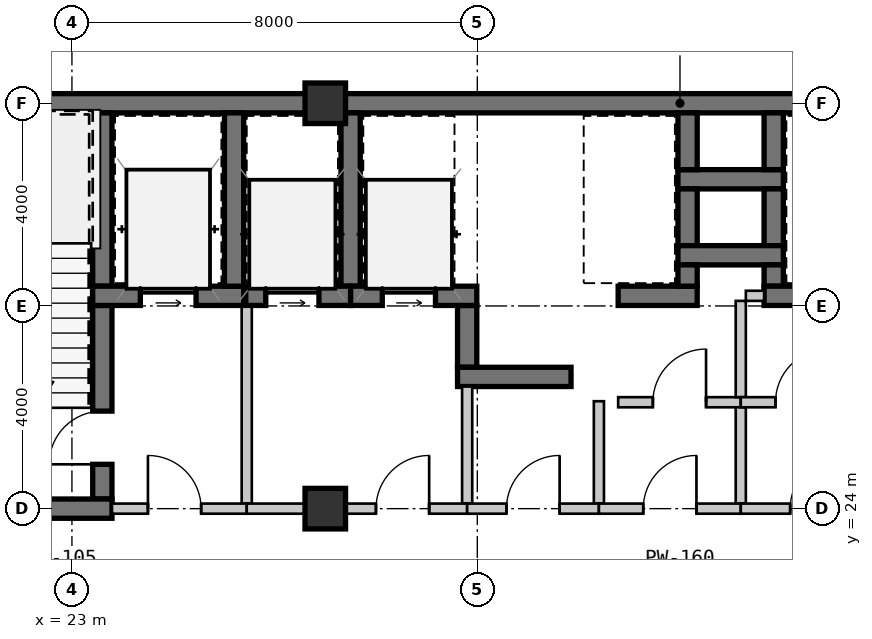
"""IFC4 building model, lengths in metres.
Left out: names, types, materials, properties, quantities, classifications, styles, units other than length and angle.
Written with IfcOpenShell. Run it as: python <this file> out.ifc"""

import sys

from ifc_helpers import new_model, si_unit, direction, frame, frame_2d, origin, origin_2d, place, context, subcontext, project, spatial, rectangle, extrude, source, transform, mapped, element, fill, save


model = new_model("IFC4")
c1 = context("Model", 3, precision=1e-05, world=origin(), true_north=direction((0.0, 1.0)))
c2 = subcontext(c1, "Body", "Model", "MODEL_VIEW")
j1 = project(units=[si_unit("LENGTHUNIT", "METRE"), si_unit("PLANEANGLEUNIT", "RADIAN")], contexts=[c1])
p1 = place(None, origin())
s1 = spatial("IfcSite", under=j1, at=p1, CompositionType="ELEMENT")
p2 = place(p1, origin())
s2 = spatial("IfcBuilding", under=s1, at=p2, CompositionType="ELEMENT")
p3 = place(p2, frame((0.0, 0.0, 45.15)))
s3 = spatial("IfcBuildingStorey", under=s2, at=p3, CompositionType="ELEMENT", Elevation=45.15)
m1 = source(origin(), c2, "Body", "SweptSolid", [
    extrude(rectangle(XDim=0.8, YDim=0.8, at=origin_2d()), origin(), (0.0, 0.0, 1.0), 3.15),
])
for number, where, z_axis, x_axis in (
    (1, (28.0, 24.0, 0.0), (0.0, 0.0, 1.0), (1.0, 0.0, 0.0)),
    (2, (28.0, 32.0, 0.0), (0.0, 0.0, 1.0), (1.0, 0.0, 0.0)),
):
    element("IfcColumn", number, at=place(p3, frame(where, z_axis=z_axis, x_axis=x_axis)), inside=s3, PredefinedType="COLUMN", context=c2, shape_type="MappedRepresentation", body=[
        mapped(m1, transform((0.0, 0.0, 0.0), scale=1.0)),
    ])
m2 = source(origin(), c2, "Body", "SweptSolid", [
    extrude(rectangle(XDim=9.19, YDim=0.38, at=frame_2d((4.595, 0.0))), origin(), (0.0, 0.0, 1.0), 2.93),
])
p4 = place(p3, frame((18.81, 32.0, 0.0), z_axis=(0.0, 0.0, 1.0), x_axis=(1.0, 0.0, 0.0)))
e3 = element("IfcWall", 3, at=p4, inside=s3, PredefinedType="SHEAR", context=c2, shape_type="MappedRepresentation", body=[
    mapped(m2, transform((0.0, 0.0, 0.0), scale=1.0)),
])
m3 = source(origin(), c2, "Body", "SweptSolid", [
    extrude(rectangle(XDim=11.2, YDim=0.38, at=frame_2d((5.6, 0.0))), origin(), (0.0, 0.0, 1.0), 2.93),
])
p5 = place(p3, frame((28.0, 32.0, 0.0), z_axis=(0.0, 0.0, 1.0), x_axis=(1.0, 0.0, 0.0)))
e4 = element("IfcWall", 4, at=p5, inside=s3, PredefinedType="SHEAR", context=c2, shape_type="MappedRepresentation", body=[
    mapped(m3, transform((0.0, 0.0, 0.0), scale=1.0)),
])
m4 = source(origin(), c2, "Body", "SweptSolid", [
    extrude(rectangle(XDim=3.42, YDim=0.38, at=frame_2d((1.71, 0.0))), origin(), (0.0, 0.0, 1.0), 2.93),
])
p6 = place(p3, frame((23.6, 28.39, 0.0), z_axis=(0.0, 0.0, 1.0), x_axis=(0.0, 1.0, 0.0)))
e5 = element("IfcWall", 5, at=p6, inside=s3, PredefinedType="SHEAR", context=c2, shape_type="MappedRepresentation", body=[
    mapped(m4, transform((0.0, 0.0, 0.0), scale=1.0)),
])
m5 = source(origin(), c2, "Body", "SweptSolid", [
    extrude(rectangle(XDim=3.82, YDim=0.38, at=frame_2d((1.91, 0.0))), origin(), (0.0, 0.0, 1.0), 2.93),
])
p7 = place(p3, frame((23.6, 24.19, 0.0), z_axis=(0.0, 0.0, 1.0), x_axis=(0.0, 1.0, 0.0)))
e6 = element("IfcWall", 6, at=p7, inside=s3, PredefinedType="SHEAR", context=c2, shape_type="MappedRepresentation", body=[
    mapped(m5, transform((0.0, 0.0, 0.0), scale=1.0)),
])
m6 = source(origin(), c2, "Body", "SweptSolid", [
    extrude(rectangle(XDim=1.05, YDim=2.1, at=frame_2d((0.525, 1.05))), frame((0.0, 0.2, 0.0), z_axis=(0.0, -1.0, 0.0), x_axis=(1.0, 0.0, 0.0)), (0.0, 0.0, 1.0), 0.4),
])
p8 = place(p7, frame((0.685, 0.0, 0.0)))
e7 = element("IfcOpeningElement", 7, at=p8, cuts=e6, PredefinedType="OPENING", context=c2, shape_type="MappedRepresentation", body=[
    mapped(m6, transform((0.0, 0.0, 0.0), scale=1.0)),
])
m7 = source(origin(), c2, "Body", "SweptSolid", [
    extrude(rectangle(XDim=4.98, YDim=0.38, at=frame_2d((2.49, 0.0))), origin(), (0.0, 0.0, 1.0), 2.93),
])
p9 = place(p3, frame((18.81, 24.0, 0.0), z_axis=(0.0, 0.0, 1.0), x_axis=(1.0, 0.0, 0.0)))
e8 = element("IfcWall", 8, at=p9, inside=s3, PredefinedType="SHEAR", context=c2, shape_type="MappedRepresentation", body=[
    mapped(m7, transform((0.0, 0.0, 0.0), scale=1.0)),
])
m8 = source(origin(), c2, "Body", "SweptSolid", [
    extrude(rectangle(XDim=2.98, YDim=0.38, at=frame_2d((1.49, 0.0))), origin(), (0.0, 0.0, 1.0), 2.93),
])
p10 = place(p3, frame((23.41, 28.2, 0.0), z_axis=(0.0, 0.0, 1.0), x_axis=(1.0, 0.0, 0.0)))
e9 = element("IfcWall", 9, at=p10, inside=s3, PredefinedType="SHEAR", context=c2, shape_type="MappedRepresentation", body=[
    mapped(m8, transform((0.0, 0.0, 0.0), scale=1.0)),
])
m9 = source(origin(), c2, "Body", "SweptSolid", [
    extrude(rectangle(XDim=1.1, YDim=2.15, at=frame_2d((0.55, 1.075))), frame((0.0, 0.2, 0.0), z_axis=(0.0, -1.0, 0.0), x_axis=(1.0, 0.0, 0.0)), (0.0, 0.0, 1.0), 0.4),
])
p11 = place(p10, frame((0.94, 0.0, 0.0)))
e10 = element("IfcOpeningElement", 10, at=p11, cuts=e9, PredefinedType="OPENING", context=c2, shape_type="MappedRepresentation", body=[
    mapped(m9, transform((0.0, 0.0, 0.0), scale=1.0)),
])
p12 = place(p3, frame((26.2, 28.39, 0.0), z_axis=(0.0, 0.0, 1.0), x_axis=(0.0, 1.0, 0.0)))
e11 = element("IfcWall", 11, at=p12, inside=s3, PredefinedType="SHEAR", context=c2, shape_type="MappedRepresentation", body=[
    mapped(m4, transform((0.0, 0.0, 0.0), scale=1.0)),
])
m10 = source(origin(), c2, "Body", "SweptSolid", [
    extrude(rectangle(XDim=3.91, YDim=0.2, at=frame_2d((1.955, 0.0))), origin(), (0.0, 0.0, 1.0), 2.93),
])
p13 = place(p3, frame((26.45, 24.1, 0.0), z_axis=(0.0, 0.0, 1.0), x_axis=(0.0, 1.0, 0.0)))
e12 = element("IfcWall", 12, at=p13, inside=s3, PredefinedType="SOLIDWALL", context=c2, shape_type="MappedRepresentation", body=[
    mapped(m10, transform((0.0, 0.0, 0.0), scale=1.0)),
])
m11 = source(origin(), c2, "Body", "SweptSolid", [
    extrude(rectangle(XDim=2.66, YDim=0.2, at=frame_2d((1.33, 0.0))), origin(), (0.0, 0.0, 1.0), 2.47),
])
p14 = place(p3, frame((23.79, 24.0, 0.0), z_axis=(0.0, 0.0, 1.0), x_axis=(1.0, 0.0, 0.0)))
e13 = element("IfcWall", 13, at=p14, inside=s3, PredefinedType="SOLIDWALL", context=c2, shape_type="MappedRepresentation", body=[
    mapped(m11, transform((0.0, 0.0, 0.0), scale=1.0)),
])
m12 = source(origin(), c2, "Body", "SweptSolid", [
    extrude(rectangle(XDim=1.05, YDim=2.1, at=frame_2d((0.525, 1.05))), frame((0.0, 0.11, 0.0), z_axis=(0.0, -1.0, 0.0), x_axis=(1.0, 0.0, 0.0)), (0.0, 0.0, 1.0), 0.22),
])
p15 = place(p14, frame((0.71, 0.0, 0.0)))
e14 = element("IfcOpeningElement", 14, at=p15, cuts=e13, PredefinedType="OPENING", context=c2, shape_type="MappedRepresentation", body=[
    mapped(m12, transform((0.0, 0.0, 0.0), scale=1.0)),
])
m13 = source(origin(), c2, "Body", "SweptSolid", [
    extrude(rectangle(XDim=2.08, YDim=0.38, at=frame_2d((1.04, 0.0))), origin(), (0.0, 0.0, 1.0), 2.93),
])
p16 = place(p3, frame((34.96, 30.5, 0.0), z_axis=(0.0, 0.0, 1.0), x_axis=(1.0, 0.0, 0.0)))
e15 = element("IfcWall", 15, at=p16, inside=s3, PredefinedType="SHEAR", context=c2, shape_type="MappedRepresentation", body=[
    mapped(m13, transform((0.0, 0.0, 0.0), scale=1.0)),
])
m14 = source(origin(), c2, "Body", "SweptSolid", [
    extrude(rectangle(XDim=1.12, YDim=0.38, at=frame_2d((0.56, 0.0))), origin(), (0.0, 0.0, 1.0), 2.93),
])
for number, where, z_axis, x_axis in (
    (16, (35.15, 31.81, 0.0), (0.0, 0.0, 1.0), (0.0, -1.0, 0.0)),
    (17, (36.85, 30.69, 0.0), (0.0, 0.0, 1.0), (0.0, 1.0, 0.0)),
    (18, (35.15, 30.31, 0.0), (0.0, 0.0, 1.0), (0.0, -1.0, 0.0)),
    (19, (36.85, 29.19, 0.0), (0.0, 0.0, 1.0), (0.0, 1.0, 0.0)),
):
    element("IfcWall", number, at=place(p3, frame(where, z_axis=z_axis, x_axis=x_axis)), inside=s3, PredefinedType="SHEAR", context=c2, shape_type="MappedRepresentation", body=[
        mapped(m14, transform((0.0, 0.0, 0.0), scale=1.0)),
    ])
p17 = place(p3, frame((34.96, 29.0, 0.0), z_axis=(0.0, 0.0, 1.0), x_axis=(1.0, 0.0, 0.0)))
e20 = element("IfcWall", 20, at=p17, inside=s3, PredefinedType="SHEAR", context=c2, shape_type="MappedRepresentation", body=[
    mapped(m13, transform((0.0, 0.0, 0.0), scale=1.0)),
])
m15 = source(origin(), c2, "Body", "SweptSolid", [
    extrude(rectangle(XDim=1.22, YDim=0.38, at=frame_2d((0.61, 0.0))), origin(), (0.0, 0.0, 1.0), 2.93),
])
p18 = place(p3, frame((30.8, 28.01, 0.0), z_axis=(0.0, 0.0, 1.0), x_axis=(0.0, -1.0, 0.0)))
e21 = element("IfcWall", 21, at=p18, inside=s3, PredefinedType="SHEAR", context=c2, shape_type="MappedRepresentation", body=[
    mapped(m15, transform((0.0, 0.0, 0.0), scale=1.0)),
])
m16 = source(origin(), c2, "Body", "SweptSolid", [
    extrude(rectangle(XDim=2.24, YDim=0.38, at=frame_2d((1.12, 0.0))), origin(), (0.0, 0.0, 1.0), 2.93),
])
p19 = place(p3, frame((30.61, 26.6, 0.0), z_axis=(0.0, 0.0, 1.0), x_axis=(1.0, 0.0, 0.0)))
e22 = element("IfcWall", 22, at=p19, inside=s3, PredefinedType="SHEAR", context=c2, shape_type="MappedRepresentation", body=[
    mapped(m16, transform((0.0, 0.0, 0.0), scale=1.0)),
])
p20 = place(p3, frame((28.5, 28.39, 0.0), z_axis=(0.0, 0.0, 1.0), x_axis=(0.0, 1.0, 0.0)))
e23 = element("IfcWall", 23, at=p20, inside=s3, PredefinedType="SHEAR", context=c2, shape_type="MappedRepresentation", body=[
    mapped(m4, transform((0.0, 0.0, 0.0), scale=1.0)),
])
m17 = source(origin(), c2, "Body", "SweptSolid", [
    extrude(rectangle(XDim=2.07, YDim=0.38, at=frame_2d((1.035, 0.0))), origin(), (0.0, 0.0, 1.0), 2.93),
])
p21 = place(p3, frame((26.43, 28.2, 0.0), z_axis=(0.0, 0.0, 1.0), x_axis=(1.0, 0.0, 0.0)))
e24 = element("IfcWall", 24, at=p21, inside=s3, PredefinedType="SHEAR", context=c2, shape_type="MappedRepresentation", body=[
    mapped(m17, transform((0.0, 0.0, 0.0), scale=1.0)),
])
m18 = source(origin(), c2, "Body", "SweptSolid", [
    extrude(rectangle(XDim=1.05, YDim=2.15, at=frame_2d((0.525, 1.075))), frame((0.0, 0.2, 0.0), z_axis=(0.0, -1.0, 0.0), x_axis=(1.0, 0.0, 0.0)), (0.0, 0.0, 1.0), 0.4),
])
p22 = place(p21, frame((0.395, 0.0, 0.0)))
e25 = element("IfcOpeningElement", 25, at=p22, cuts=e24, PredefinedType="OPENING", context=c2, shape_type="MappedRepresentation", body=[
    mapped(m18, transform((0.0, 0.0, 0.0), scale=1.0)),
])
m19 = source(origin(), c2, "Body", "SweptSolid", [
    extrude(rectangle(XDim=2.49, YDim=0.38, at=frame_2d((1.245, 0.0))), origin(), (0.0, 0.0, 1.0), 2.93),
])
p23 = place(p3, frame((28.5, 28.2, 0.0), z_axis=(0.0, 0.0, 1.0), x_axis=(1.0, 0.0, 0.0)))
e26 = element("IfcWall", 26, at=p23, inside=s3, PredefinedType="SHEAR", context=c2, shape_type="MappedRepresentation", body=[
    mapped(m19, transform((0.0, 0.0, 0.0), scale=1.0)),
])
p24 = place(p23, frame((0.625, 0.0, 0.0)))
e27 = element("IfcOpeningElement", 27, at=p24, cuts=e26, PredefinedType="OPENING", context=c2, shape_type="MappedRepresentation", body=[
    mapped(m18, transform((0.0, 0.0, 0.0), scale=1.0)),
])
m20 = source(origin(), c2, "Body", "SweptSolid", [
    extrude(rectangle(XDim=2.31, YDim=0.2, at=frame_2d((1.155, 0.0))), origin(), (0.0, 0.0, 1.0), 2.93),
])
p25 = place(p3, frame((30.8, 26.41, 0.0), z_axis=(0.0, 0.0, 1.0), x_axis=(0.0, -1.0, 0.0)))
e28 = element("IfcWall", 28, at=p25, inside=s3, PredefinedType="SOLIDWALL", context=c2, shape_type="MappedRepresentation", body=[
    mapped(m20, transform((0.0, 0.0, 0.0), scale=1.0)),
])
m21 = source(origin(), c2, "Body", "SweptSolid", [
    extrude(rectangle(XDim=4.35, YDim=0.2, at=frame_2d((2.175, 0.0))), origin(), (0.0, 0.0, 1.0), 2.47),
])
p26 = place(p3, frame((30.8, 24.0, 0.0), z_axis=(0.0, 0.0, 1.0), x_axis=(-1.0, 0.0, 0.0)))
e29 = element("IfcWall", 29, at=p26, inside=s3, PredefinedType="SOLIDWALL", context=c2, shape_type="MappedRepresentation", body=[
    mapped(m21, transform((0.0, 0.0, 0.0), scale=1.0)),
])
p27 = place(p26, frame((0.75, 0.0, 0.0)))
e30 = element("IfcOpeningElement", 30, at=p27, cuts=e29, PredefinedType="OPENING", context=c2, shape_type="MappedRepresentation", body=[
    mapped(m12, transform((0.0, 0.0, 0.0), scale=1.0)),
])
m22 = source(origin(), c2, "Body", "SweptSolid", [
    extrude(rectangle(XDim=1.56, YDim=0.38, at=frame_2d((0.78, 0.0))), origin(), (0.0, 0.0, 1.0), 2.93),
])
p28 = place(p3, frame((33.78, 28.2, 0.0), z_axis=(0.0, 0.0, 1.0), x_axis=(1.0, 0.0, 0.0)))
e31 = element("IfcWall", 31, at=p28, inside=s3, PredefinedType="SHEAR", context=c2, shape_type="MappedRepresentation", body=[
    mapped(m22, transform((0.0, 0.0, 0.0), scale=1.0)),
])
m23 = source(origin(), c2, "Body", "SweptSolid", [
    extrude(rectangle(XDim=0.42, YDim=0.38, at=frame_2d((0.21, 0.0))), origin(), (0.0, 0.0, 1.0), 2.93),
])
for number, where, z_axis, x_axis in (
    (32, (35.15, 28.39, 0.0), (0.0, 0.0, 1.0), (0.0, 1.0, 0.0)),
    (33, (36.85, 28.81, 0.0), (0.0, 0.0, 1.0), (0.0, -1.0, 0.0)),
):
    element("IfcWall", number, at=place(p3, frame(where, z_axis=z_axis, x_axis=x_axis)), inside=s3, PredefinedType="SHEAR", context=c2, shape_type="MappedRepresentation", body=[
        mapped(m23, transform((0.0, 0.0, 0.0), scale=1.0)),
    ])
m24 = source(origin(), c2, "Body", "SweptSolid", [
    extrude(rectangle(XDim=1.96, YDim=0.38, at=frame_2d((0.98, 0.0))), origin(), (0.0, 0.0, 1.0), 2.93),
])
p29 = place(p3, frame((36.66, 28.2, 0.0), z_axis=(0.0, 0.0, 1.0), x_axis=(1.0, 0.0, 0.0)))
e34 = element("IfcWall", 34, at=p29, inside=s3, PredefinedType="SHEAR", context=c2, shape_type="MappedRepresentation", body=[
    mapped(m24, transform((0.0, 0.0, 0.0), scale=1.0)),
])
m25 = source(origin(), c2, "Body", "SweptSolid", [
    extrude(rectangle(XDim=2.02, YDim=0.2, at=frame_2d((1.01, 0.0))), origin(), (0.0, 0.0, 1.0), 2.93),
])
p30 = place(p3, frame((33.4, 26.12, 0.0), z_axis=(0.0, 0.0, 1.0), x_axis=(0.0, -1.0, 0.0)))
e35 = element("IfcWall", 35, at=p30, inside=s3, PredefinedType="SOLIDWALL", context=c2, shape_type="MappedRepresentation", body=[
    mapped(m25, transform((0.0, 0.0, 0.0), scale=1.0)),
])
m26 = source(origin(), c2, "Body", "SweptSolid", [
    extrude(rectangle(XDim=2.6, YDim=0.2, at=frame_2d((1.3, 0.0))), origin(), (0.0, 0.0, 1.0), 2.47),
])
p31 = place(p3, frame((33.4, 24.0, 0.0), z_axis=(0.0, 0.0, 1.0), x_axis=(-1.0, 0.0, 0.0)))
e36 = element("IfcWall", 36, at=p31, inside=s3, PredefinedType="SOLIDWALL", context=c2, shape_type="MappedRepresentation", body=[
    mapped(m26, transform((0.0, 0.0, 0.0), scale=1.0)),
])
p32 = place(p31, frame((0.775, 0.0, 0.0)))
e37 = element("IfcOpeningElement", 37, at=p32, cuts=e36, PredefinedType="OPENING", context=c2, shape_type="MappedRepresentation", body=[
    mapped(m12, transform((0.0, 0.0, 0.0), scale=1.0)),
])
m27 = source(origin(), c2, "Body", "SweptSolid", [
    extrude(rectangle(XDim=2.42, YDim=0.2, at=frame_2d((1.21, 0.0))), origin(), (0.0, 0.0, 1.0), 2.93),
])
p33 = place(p3, frame((33.78, 26.1, 0.0), z_axis=(0.0, 0.0, 1.0), x_axis=(1.0, 0.0, 0.0)))
e38 = element("IfcWall", 38, at=p33, inside=s3, PredefinedType="SOLIDWALL", context=c2, shape_type="MappedRepresentation", body=[
    mapped(m27, transform((0.0, 0.0, 0.0), scale=1.0)),
])
p34 = place(p33, frame((0.685, 0.0, 0.0)))
e39 = element("IfcOpeningElement", 39, at=p34, cuts=e38, PredefinedType="OPENING", context=c2, shape_type="MappedRepresentation", body=[
    mapped(m12, transform((0.0, 0.0, 0.0), scale=1.0)),
])
m28 = source(origin(), c2, "Body", "SweptSolid", [
    extrude(rectangle(XDim=1.9, YDim=0.2, at=frame_2d((0.95, 0.0))), origin(), (0.0, 0.0, 1.0), 2.93),
])
p35 = place(p3, frame((36.2, 26.0, 0.0), z_axis=(0.0, 0.0, 1.0), x_axis=(0.0, -1.0, 0.0)))
e40 = element("IfcWall", 40, at=p35, inside=s3, PredefinedType="SOLIDWALL", context=c2, shape_type="MappedRepresentation", body=[
    mapped(m28, transform((0.0, 0.0, 0.0), scale=1.0)),
])
m29 = source(origin(), c2, "Body", "SweptSolid", [
    extrude(rectangle(XDim=2.8, YDim=0.2, at=frame_2d((1.4, 0.0))), origin(), (0.0, 0.0, 1.0), 2.47),
])
p36 = place(p3, frame((36.2, 24.0, 0.0), z_axis=(0.0, 0.0, 1.0), x_axis=(-1.0, 0.0, 0.0)))
e41 = element("IfcWall", 41, at=p36, inside=s3, PredefinedType="SOLIDWALL", context=c2, shape_type="MappedRepresentation", body=[
    mapped(m29, transform((0.0, 0.0, 0.0), scale=1.0)),
])
p37 = place(p36, frame((0.875, 0.0, 0.0)))
e42 = element("IfcOpeningElement", 42, at=p37, cuts=e41, PredefinedType="OPENING", context=c2, shape_type="MappedRepresentation", body=[
    mapped(m12, transform((0.0, 0.0, 0.0), scale=1.0)),
])
m30 = source(origin(), c2, "Body", "SweptSolid", [
    extrude(rectangle(XDim=1.9, YDim=0.2, at=frame_2d((0.95, 0.0))), origin(), (0.0, 0.0, 1.0), 2.93),
])
p38 = place(p3, frame((36.2, 28.1, 0.0), z_axis=(0.0, 0.0, 1.0), x_axis=(0.0, -1.0, 0.0)))
e43 = element("IfcWall", 43, at=p38, inside=s3, PredefinedType="SOLIDWALL", context=c2, shape_type="MappedRepresentation", body=[
    mapped(m30, transform((0.0, 0.0, 0.0), scale=1.0)),
])
m31 = source(origin(), c2, "Body", "SweptSolid", [
    extrude(rectangle(XDim=0.36, YDim=0.2, at=frame_2d((0.18, 0.0))), origin(), (0.0, 0.0, 1.0), 2.93),
])
p39 = place(p3, frame((36.66, 28.2, 0.0), z_axis=(0.0, 0.0, 1.0), x_axis=(-1.0, 0.0, 0.0)))
e44 = element("IfcWall", 44, at=p39, inside=s3, PredefinedType="SOLIDWALL", context=c2, shape_type="MappedRepresentation", body=[
    mapped(m31, transform((0.0, 0.0, 0.0), scale=1.0)),
])
m32 = source(origin(), c2, "Body", "SweptSolid", [
    extrude(rectangle(XDim=2.42, YDim=0.2, at=frame_2d((1.21, 0.0))), origin(), (0.0, 0.0, 1.0), 2.93),
])
p40 = place(p3, frame((36.2, 26.1, 0.0), z_axis=(0.0, 0.0, 1.0), x_axis=(1.0, 0.0, 0.0)))
e45 = element("IfcWall", 45, at=p40, inside=s3, PredefinedType="SOLIDWALL", context=c2, shape_type="MappedRepresentation", body=[
    mapped(m32, transform((0.0, 0.0, 0.0), scale=1.0)),
])
p41 = place(p40, frame((0.685, 0.0, 0.0)))
e46 = element("IfcOpeningElement", 46, at=p41, cuts=e45, PredefinedType="OPENING", context=c2, shape_type="MappedRepresentation", body=[
    mapped(m12, transform((0.0, 0.0, 0.0), scale=1.0)),
])
m33 = source(origin(), c2, "Body", "SweptSolid", [
    extrude(rectangle(XDim=3.0, YDim=0.2, at=frame_2d((1.5, 0.0))), origin(), (0.0, 0.0, 1.0), 2.47),
])
p42 = place(p3, frame((39.2, 24.0, 0.0), z_axis=(0.0, 0.0, 1.0), x_axis=(-1.0, 0.0, 0.0)))
e47 = element("IfcWall", 47, at=p42, inside=s3, PredefinedType="SOLIDWALL", context=c2, shape_type="MappedRepresentation", body=[
    mapped(m33, transform((0.0, 0.0, 0.0), scale=1.0)),
])
p43 = place(p42, frame((0.975, 0.0, 0.0)))
e48 = element("IfcOpeningElement", 48, at=p43, cuts=e47, PredefinedType="OPENING", context=c2, shape_type="MappedRepresentation", body=[
    mapped(m12, transform((0.0, 0.0, 0.0), scale=1.0)),
])
m34 = source(origin(), c2, "Body", "SweptSolid", [
    extrude(rectangle(XDim=1.05, YDim=2.1, at=frame_2d((0.525, 1.05))), frame((0.0, 0.025, 0.0), z_axis=(0.0, -1.0, 0.0), x_axis=(1.0, 0.0, 0.0)), (0.0, 0.0, 1.0), 0.05),
])
p44 = place(p8, origin())
e49 = element("IfcDoor", 49, at=p44, inside=s3, OperationType="SINGLE_SWING_LEFT", PredefinedType="DOOR", context=c2, shape_type="MappedRepresentation", body=[
    mapped(m34, transform((0.0, 0.0, 0.0), scale=1.0)),
])
fill(e7, e49)
m35 = source(origin(), c2, "Body", "SweptSolid", [
    extrude(rectangle(XDim=1.1, YDim=2.15, at=frame_2d((0.55, 1.075))), frame((0.0, 0.025, 0.0), z_axis=(0.0, -1.0, 0.0), x_axis=(1.0, 0.0, 0.0)), (0.0, 0.0, 1.0), 0.05),
])
p45 = place(p11, origin())
e50 = element("IfcDoor", 50, at=p45, inside=s3, OperationType="SLIDING_TO_LEFT", PredefinedType="DOOR", context=c2, shape_type="MappedRepresentation", body=[
    mapped(m35, transform((0.0, 0.0, 0.0), scale=1.0)),
])
fill(e10, e50)
p46 = place(p15, origin())
e51 = element("IfcDoor", 51, at=p46, inside=s3, OperationType="SINGLE_SWING_LEFT", PredefinedType="DOOR", context=c2, shape_type="MappedRepresentation", body=[
    mapped(m34, transform((0.0, 0.0, 0.0), scale=1.0)),
])
fill(e14, e51)
m36 = source(origin(), c2, "Body", "SweptSolid", [
    extrude(rectangle(XDim=1.05, YDim=2.15, at=frame_2d((0.525, 1.075))), frame((0.0, 0.025, 0.0), z_axis=(0.0, -1.0, 0.0), x_axis=(1.0, 0.0, 0.0)), (0.0, 0.0, 1.0), 0.05),
])
p47 = place(p22, origin())
e52 = element("IfcDoor", 52, at=p47, inside=s3, OperationType="SLIDING_TO_LEFT", PredefinedType="DOOR", context=c2, shape_type="MappedRepresentation", body=[
    mapped(m36, transform((0.0, 0.0, 0.0), scale=1.0)),
])
fill(e25, e52)
p48 = place(p24, origin())
e53 = element("IfcDoor", 53, at=p48, inside=s3, OperationType="SLIDING_TO_LEFT", PredefinedType="DOOR", context=c2, shape_type="MappedRepresentation", body=[
    mapped(m36, transform((0.0, 0.0, 0.0), scale=1.0)),
])
fill(e27, e53)
p49 = place(p27, frame((1.05, 0.0, 0.0), z_axis=(0.0, 0.0, 1.0), x_axis=(-1.0, 0.0, 0.0)))
e54 = element("IfcDoor", 54, at=p49, inside=s3, OperationType="SINGLE_SWING_RIGHT", PredefinedType="DOOR", context=c2, shape_type="MappedRepresentation", body=[
    mapped(m34, transform((0.0, 0.0, 0.0), scale=1.0)),
])
fill(e30, e54)
p50 = place(p32, frame((1.05, 0.0, 0.0), z_axis=(0.0, 0.0, 1.0), x_axis=(-1.0, 0.0, 0.0)))
e55 = element("IfcDoor", 55, at=p50, inside=s3, OperationType="SINGLE_SWING_RIGHT", PredefinedType="DOOR", context=c2, shape_type="MappedRepresentation", body=[
    mapped(m34, transform((0.0, 0.0, 0.0), scale=1.0)),
])
fill(e37, e55)
p51 = place(p34, origin())
e56 = element("IfcDoor", 56, at=p51, inside=s3, OperationType="SINGLE_SWING_RIGHT", PredefinedType="DOOR", context=c2, shape_type="MappedRepresentation", body=[
    mapped(m34, transform((0.0, 0.0, 0.0), scale=1.0)),
])
fill(e39, e56)
p52 = place(p37, frame((1.05, 0.0, 0.0), z_axis=(0.0, 0.0, 1.0), x_axis=(-1.0, 0.0, 0.0)))
e57 = element("IfcDoor", 57, at=p52, inside=s3, OperationType="SINGLE_SWING_RIGHT", PredefinedType="DOOR", context=c2, shape_type="MappedRepresentation", body=[
    mapped(m34, transform((0.0, 0.0, 0.0), scale=1.0)),
])
fill(e42, e57)
p53 = place(p41, origin())
e58 = element("IfcDoor", 58, at=p53, inside=s3, OperationType="SINGLE_SWING_RIGHT", PredefinedType="DOOR", context=c2, shape_type="MappedRepresentation", body=[
    mapped(m34, transform((0.0, 0.0, 0.0), scale=1.0)),
])
fill(e46, e58)
p54 = place(p43, frame((1.05, 0.0, 0.0), z_axis=(0.0, 0.0, 1.0), x_axis=(-1.0, 0.0, 0.0)))
e59 = element("IfcDoor", 59, at=p54, inside=s3, OperationType="SINGLE_SWING_RIGHT", PredefinedType="DOOR", context=c2, shape_type="MappedRepresentation", body=[
    mapped(m34, transform((0.0, 0.0, 0.0), scale=1.0)),
])
fill(e48, e59)
save(model, sys.argv[1])
